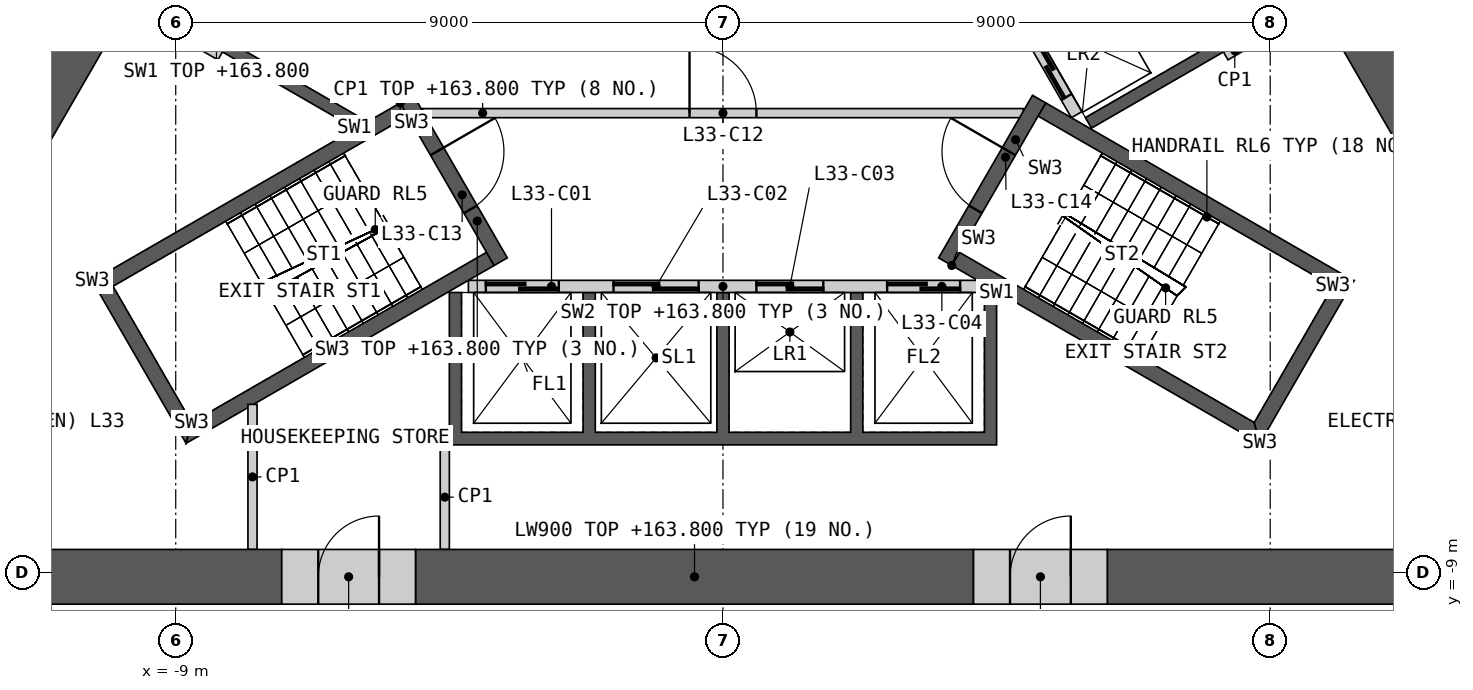
"""IFC4 building model, lengths in metres.
Left out: names, types, materials, properties, quantities, classifications, styles, units other than length and angle.
Written with IfcOpenShell. Run it as: python <this file> out.ifc"""

import sys

from ifc_helpers import new_model, si_unit, direction, frame, frame_2d, origin, place, context, subcontext, project, spatial, polyline, rectangle, outline, extrude, element, fill, save


model = new_model("IFC4")
c1 = context("Model", 3, precision=1e-05, world=origin(), true_north=direction((0.0, 1.0)))
c2 = subcontext(c1, "Body", "Model", "MODEL_VIEW")
j1 = project(units=[si_unit("LENGTHUNIT", "METRE"), si_unit("PLANEANGLEUNIT", "RADIAN")], contexts=[c1])
p1 = place(None, origin())
s1 = spatial("IfcSite", under=j1, at=p1, CompositionType="ELEMENT")
p2 = place(p1, origin())
s2 = spatial("IfcBuilding", under=s1, at=p2, CompositionType="ELEMENT")
p3 = place(p2, frame((0.0, 0.0, 154.2)))
s3 = spatial("IfcBuildingStorey", under=s2, at=p3, CompositionType="ELEMENT", Elevation=154.2)
p4 = place(p3, origin())
e1 = element("IfcWall", 1, at=p4, inside=s3, PredefinedType="SHEAR", context=c2, shape_type="SweptSolid", body=[
    extrude(outline(polyline([(4.5, -4.4), (4.5, -6.906), (-4.5, -6.906), (-4.5, -4.4), (-4.3, -4.4), (-4.3, -6.7), (-2.3, -6.7), (-2.3, -4.4), (-2.1, -4.4), (-2.1, -6.7), (-0.1, -6.7), (-0.1, -4.4), (0.1, -4.4), (0.1, -6.7), (2.1, -6.7), (2.1, -4.4), (2.3, -4.4), (2.3, -6.7), (4.3, -6.7), (4.3, -4.4), (4.5, -4.4)])), origin(), (0.0, 0.0, 1.0), 9.6),
])
p5 = place(p3, frame((-4.187, -4.3, 0.0), z_axis=(0.0, 0.0, 1.0), x_axis=(1.0, 0.0, 0.0)))
e2 = element("IfcWall", 2, at=p5, inside=s3, PredefinedType="SOLIDWALL", context=c2, shape_type="SweptSolid", body=[
    extrude(rectangle(XDim=8.373, YDim=0.2, at=frame_2d((4.187, 0.0))), origin(), (0.0, 0.0, 1.0), 9.6),
])
p6 = place(p5, frame((0.287, 0.0, 0.0)))
e3 = element("IfcOpeningElement", 3, at=p6, cuts=e2, PredefinedType="OPENING", context=c2, shape_type="SweptSolid", body=[
    extrude(rectangle(XDim=1.2, YDim=2.1, at=frame_2d((0.6, 1.05))), frame((0.0, 0.11, 0.0), z_axis=(0.0, -1.0, 0.0), x_axis=(1.0, 0.0, 0.0)), (0.0, 0.0, 1.0), 0.22),
])
p7 = place(p5, frame((2.387, 0.0, 0.0)))
e4 = element("IfcOpeningElement", 4, at=p7, cuts=e2, PredefinedType="OPENING", context=c2, shape_type="SweptSolid", body=[
    extrude(rectangle(XDim=1.4, YDim=2.1, at=frame_2d((0.7, 1.05))), frame((0.0, 0.11, 0.0), z_axis=(0.0, -1.0, 0.0), x_axis=(1.0, 0.0, 0.0)), (0.0, 0.0, 1.0), 0.22),
])
p8 = place(p5, frame((4.737, 0.0, 0.0)))
e5 = element("IfcOpeningElement", 5, at=p8, cuts=e2, PredefinedType="OPENING", context=c2, shape_type="SweptSolid", body=[
    extrude(rectangle(XDim=1.1, YDim=2.1, at=frame_2d((0.55, 1.05))), frame((0.0, 0.11, 0.0), z_axis=(0.0, -1.0, 0.0), x_axis=(1.0, 0.0, 0.0)), (0.0, 0.0, 1.0), 0.22),
])
p9 = place(p5, frame((6.887, 0.0, 0.0)))
e6 = element("IfcOpeningElement", 6, at=p9, cuts=e2, PredefinedType="OPENING", context=c2, shape_type="SweptSolid", body=[
    extrude(rectangle(XDim=1.2, YDim=2.1, at=frame_2d((0.6, 1.05))), frame((0.0, 0.11, 0.0), z_axis=(0.0, -1.0, 0.0), x_axis=(1.0, 0.0, 0.0)), (0.0, 0.0, 1.0), 0.22),
])
p10 = place(p3, origin())
e7 = element("IfcWall", 7, at=p10, inside=s3, PredefinedType="SHEAR", context=c2, shape_type="SweptSolid", body=[
    extrude(outline(polyline([(1.561, 6.097), (3.731, 7.35), (8.231, -0.444), (6.061, -1.697), (5.96, -1.524), (7.952, -0.374), (6.952, 1.358), (4.96, 0.208), (4.861, 0.381), (6.852, 1.531), (5.852, 3.263), (3.861, 2.113), (3.76, 2.287), (5.752, 3.437), (4.752, 5.169), (2.76, 4.019), (2.66, 4.192), (4.652, 5.342), (3.652, 7.074), (1.66, 5.924), (1.561, 6.097)])), origin(), (0.0, 0.0, 1.0), 9.6),
])
p11 = place(p3, frame((5.817, -1.476, 0.0), z_axis=(0.0, 0.0, 1.0), x_axis=(-0.500002616675, 0.866023893041, 0.0)))
e8 = element("IfcWall", 8, at=p11, inside=s3, PredefinedType="SOLIDWALL", context=c2, shape_type="SweptSolid", body=[
    extrude(rectangle(XDim=8.373, YDim=0.2, at=frame_2d((4.187, 0.0))), origin(), (0.0, 0.0, 1.0), 9.6),
])
p12 = place(p11, frame((0.337, 0.0, 0.0)))
e9 = element("IfcOpeningElement", 9, at=p12, cuts=e8, PredefinedType="OPENING", context=c2, shape_type="SweptSolid", body=[
    extrude(rectangle(XDim=1.1, YDim=2.1, at=frame_2d((0.55, 1.05))), frame((0.0, 0.11, 0.0), z_axis=(0.0, -1.0, 0.0), x_axis=(1.0, 0.0, 0.0)), (0.0, 0.0, 1.0), 0.22),
])
p13 = place(p11, frame((2.537, 0.0, 0.0)))
e10 = element("IfcOpeningElement", 10, at=p13, cuts=e8, PredefinedType="OPENING", context=c2, shape_type="SweptSolid", body=[
    extrude(rectangle(XDim=1.1, YDim=2.1, at=frame_2d((0.55, 1.05))), frame((0.0, 0.11, 0.0), z_axis=(0.0, -1.0, 0.0), x_axis=(1.0, 0.0, 0.0)), (0.0, 0.0, 1.0), 0.22),
])
p14 = place(p11, frame((4.737, 0.0, 0.0)))
e11 = element("IfcOpeningElement", 11, at=p14, cuts=e8, PredefinedType="OPENING", context=c2, shape_type="SweptSolid", body=[
    extrude(rectangle(XDim=1.1, YDim=2.1, at=frame_2d((0.55, 1.05))), frame((0.0, 0.11, 0.0), z_axis=(0.0, -1.0, 0.0), x_axis=(1.0, 0.0, 0.0)), (0.0, 0.0, 1.0), 0.22),
])
p15 = place(p11, frame((6.937, 0.0, 0.0)))
e12 = element("IfcOpeningElement", 12, at=p15, cuts=e8, PredefinedType="OPENING", context=c2, shape_type="SweptSolid", body=[
    extrude(rectangle(XDim=1.1, YDim=2.1, at=frame_2d((0.55, 1.05))), frame((0.0, 0.11, 0.0), z_axis=(0.0, -1.0, 0.0), x_axis=(1.0, 0.0, 0.0)), (0.0, 0.0, 1.0), 0.22),
])
p16 = place(p3, origin())
e13 = element("IfcWall", 13, at=p16, inside=s3, PredefinedType="SHEAR", context=c2, shape_type="SweptSolid", body=[
    extrude(outline(polyline([(-6.061, -1.697), (-8.231, -0.444), (-8.131, -0.271), (-5.96, -1.524), (-6.061, -1.697)])), origin(), (0.0, 0.0, 1.0), 9.6),
])
p17 = place(p3, frame((-4.941, -1.45, 0.0), z_axis=(0.0, 0.0, 1.0), x_axis=(1.0, 0.0, 0.0)))
e14 = element("IfcWall", 14, at=p17, inside=s3, PredefinedType="PARTITIONING", context=c2, shape_type="SweptSolid", body=[
    extrude(rectangle(XDim=9.882, YDim=0.15, at=frame_2d((4.941, 0.0))), origin(), (0.0, 0.0, 1.0), 9.6),
])
p18 = place(p17, frame((4.391, 0.0, 0.0)))
e15 = element("IfcOpeningElement", 15, at=p18, cuts=e14, PredefinedType="OPENING", context=c2, shape_type="SweptSolid", body=[
    extrude(rectangle(XDim=1.1, YDim=2.1, at=frame_2d((0.55, 1.05))), frame((0.0, 0.085, 0.0), z_axis=(0.0, -1.0, 0.0), x_axis=(1.0, 0.0, 0.0)), (0.0, 0.0, 1.0), 0.17),
])
p19 = place(p3, origin())
e16 = element("IfcWall", 16, at=p19, inside=s3, PredefinedType="SHEAR", context=c2, shape_type="SweptSolid", body=[
    extrude(outline(polyline([(-5.307, -1.281), (-10.374, -4.206), (-10.032, -4.298), (-5.182, -1.498), (-5.307, -1.281)])), origin(), (0.0, 0.0, 1.0), 9.6),
])
p20 = place(p3, origin())
e17 = element("IfcWall", 17, at=p20, inside=s3, PredefinedType="SHEAR", context=c2, shape_type="SweptSolid", body=[
    extrude(outline(polyline([(-10.374, -4.206), (-8.83, -6.881), (-8.738, -6.539), (-10.032, -4.298), (-10.374, -4.206)])), origin(), (0.0, 0.0, 1.0), 9.6),
])
p21 = place(p3, origin())
e18 = element("IfcWall", 18, at=p21, inside=s3, PredefinedType="SHEAR", context=c2, shape_type="SweptSolid", body=[
    extrude(outline(polyline([(-8.738, -6.539), (-8.83, -6.881), (-3.763, -3.956), (-3.888, -3.739), (-8.738, -6.539)])), origin(), (0.0, 0.0, 1.0), 9.6),
])
p22 = place(p3, frame((-5.199, -1.219, 0.0), z_axis=(0.0, 0.0, 1.0), x_axis=(0.499982516597, -0.866035497597, 0.0)))
e19 = element("IfcWall", 19, at=p22, inside=s3, PredefinedType="SHEAR", context=c2, shape_type="SweptSolid", body=[
    extrude(rectangle(XDim=3.088, YDim=0.25, at=frame_2d((1.544, 0.0))), origin(), (0.0, 0.0, 1.0), 9.6),
])
p23 = place(p22, frame((0.994, 0.0, 0.0)))
e20 = element("IfcOpeningElement", 20, at=p23, cuts=e19, PredefinedType="OPENING", context=c2, shape_type="SweptSolid", body=[
    extrude(rectangle(XDim=1.1, YDim=2.1, at=frame_2d((0.55, 1.05))), frame((0.0, 0.135, 0.0), z_axis=(0.0, -1.0, 0.0), x_axis=(1.0, 0.0, 0.0)), (0.0, 0.0, 1.0), 0.27),
])
p24 = place(p3, origin())
e21 = element("IfcWall", 21, at=p24, inside=s3, PredefinedType="SHEAR", context=c2, shape_type="SweptSolid", body=[
    extrude(outline(polyline([(3.763, -3.956), (8.83, -6.881), (8.738, -6.539), (3.888, -3.739), (3.763, -3.956)])), origin(), (0.0, 0.0, 1.0), 9.6),
])
p25 = place(p3, origin())
e22 = element("IfcWall", 22, at=p25, inside=s3, PredefinedType="SHEAR", context=c2, shape_type="SweptSolid", body=[
    extrude(outline(polyline([(8.83, -6.881), (10.374, -4.206), (10.032, -4.298), (8.738, -6.539), (8.83, -6.881)])), origin(), (0.0, 0.0, 1.0), 9.6),
])
p26 = place(p3, origin())
e23 = element("IfcWall", 23, at=p26, inside=s3, PredefinedType="SHEAR", context=c2, shape_type="SweptSolid", body=[
    extrude(outline(polyline([(10.032, -4.298), (10.374, -4.206), (5.307, -1.281), (5.182, -1.498), (10.032, -4.298)])), origin(), (0.0, 0.0, 1.0), 9.6),
])
p27 = place(p3, frame((3.655, -3.893, 0.0), z_axis=(0.0, 0.0, 1.0), x_axis=(0.499982516597, 0.866035497597, 0.0)))
e24 = element("IfcWall", 24, at=p27, inside=s3, PredefinedType="SHEAR", context=c2, shape_type="SweptSolid", body=[
    extrude(rectangle(XDim=3.088, YDim=0.25, at=frame_2d((1.544, 0.0))), origin(), (0.0, 0.0, 1.0), 9.6),
])
p28 = place(p27, frame((0.994, 0.0, 0.0)))
e25 = element("IfcOpeningElement", 25, at=p28, cuts=e24, PredefinedType="OPENING", context=c2, shape_type="SweptSolid", body=[
    extrude(rectangle(XDim=1.1, YDim=2.1, at=frame_2d((0.55, 1.05))), frame((0.0, 0.135, 0.0), z_axis=(0.0, -1.0, 0.0), x_axis=(1.0, 0.0, 0.0)), (0.0, 0.0, 1.0), 0.27),
])
for number, where, z_axis, x_axis in (
    (26, (8.268, -0.509, 0.0), (0.0, 0.0, 1.0), (0.866, 0.5, 0.0)),
    (27, (-8.268, -0.509, 0.0), (0.0, 0.0, 1.0), (-0.866, 0.5, 0.0)),
    (28, (-4.575, -6.906, 0.0), (0.0, 0.0, 1.0), (0.0, -1.0, 0.0)),
):
    element("IfcWall", number, at=place(p3, frame(where, z_axis=z_axis, x_axis=x_axis)), inside=s3, PredefinedType="PARTITIONING", context=c2, shape_type="SweptSolid", body=[
        extrude(rectangle(XDim=1.72, YDim=0.15, at=frame_2d((0.86, 0.0))), origin(), (0.0, 0.0, 1.0), 9.6),
    ])
p29 = place(p3, frame((-7.737, -8.626, 0.0), z_axis=(0.0, 0.0, 1.0), x_axis=(0.0, 1.0, 0.0)))
e29 = element("IfcWall", 29, at=p29, inside=s3, PredefinedType="PARTITIONING", context=c2, shape_type="SweptSolid", body=[
    extrude(rectangle(XDim=2.386, YDim=0.15, at=frame_2d((1.193, 0.0))), origin(), (0.0, 0.0, 1.0), 9.6),
])
p30 = place(p3, frame((-5.056, -9.076, 0.0), z_axis=(0.0, 0.0, 1.0), x_axis=(1.0, 0.0, 0.0)))
e30 = element("IfcWall", 30, at=p30, inside=s3, PredefinedType="SHEAR", context=c2, shape_type="SweptSolid", body=[
    extrude(rectangle(XDim=9.177, YDim=0.9, at=frame_2d((4.588, 0.0))), origin(), (0.0, 0.0, 1.0), 9.6),
])
p31 = place(p3, frame((6.321, -9.076, 0.0), z_axis=(0.0, 0.0, 1.0), x_axis=(1.0, 0.0, 0.0)))
e31 = element("IfcWall", 31, at=p31, inside=s3, PredefinedType="SHEAR", context=c2, shape_type="SweptSolid", body=[
    extrude(rectangle(XDim=8.621, YDim=0.9, at=frame_2d((4.31, 0.0))), origin(), (0.0, 0.0, 1.0), 9.6),
])
p32 = place(p3, frame((-14.941, -9.076, 0.0), z_axis=(0.0, 0.0, 1.0), x_axis=(1.0, 0.0, 0.0)))
e32 = element("IfcWall", 32, at=p32, inside=s3, PredefinedType="SHEAR", context=c2, shape_type="SweptSolid", body=[
    extrude(rectangle(XDim=7.685, YDim=0.9, at=frame_2d((3.843, 0.0))), origin(), (0.0, 0.0, 1.0), 9.6),
])
p33 = place(p3, frame((15.331, -8.401, 0.0), z_axis=(0.0, 0.0, 1.0), x_axis=(-0.499990163897, 0.866031082587, 0.0)))
e33 = element("IfcWall", 33, at=p33, inside=s3, PredefinedType="SHEAR", context=c2, shape_type="SweptSolid", body=[
    extrude(rectangle(XDim=13.841, YDim=0.9, at=frame_2d((6.92, 0.0))), origin(), (0.0, 0.0, 1.0), 9.6),
])
p34 = place(p3, frame((-10.06, 0.728, 0.0), z_axis=(0.0, 0.0, 1.0), x_axis=(-0.499996331799, -0.866027521611, 0.0)))
e34 = element("IfcWall", 34, at=p34, inside=s3, PredefinedType="SHEAR", context=c2, shape_type="SweptSolid", body=[
    extrude(rectangle(XDim=4.295, YDim=0.9, at=frame_2d((2.148, 0.0))), origin(), (0.0, 0.0, 1.0), 9.6),
])
p35 = place(p3, frame((-7.256, -9.076, 0.0), z_axis=(0.0, 0.0, 1.0), x_axis=(1.0, 0.0, 0.0)))
e35 = element("IfcWall", 35, at=p35, inside=s3, PredefinedType="SHEAR", context=c2, shape_type="SweptSolid", body=[
    extrude(rectangle(XDim=2.2, YDim=0.9, at=frame_2d((1.1, 0.0))), origin(), (0.0, 0.0, 1.0), 9.6),
])
p36 = place(p35, frame((0.6, 0.0, 0.0)))
e36 = element("IfcOpeningElement", 36, at=p36, cuts=e35, PredefinedType="OPENING", context=c2, shape_type="SweptSolid", body=[
    extrude(rectangle(XDim=1.0, YDim=2.1, at=frame_2d((0.5, 1.05))), frame((0.0, 0.46, 0.0), z_axis=(0.0, -1.0, 0.0), x_axis=(1.0, 0.0, 0.0)), (0.0, 0.0, 1.0), 0.92),
])
p37 = place(p3, frame((4.121, -9.076, 0.0), z_axis=(0.0, 0.0, 1.0), x_axis=(1.0, 0.0, 0.0)))
e37 = element("IfcWall", 37, at=p37, inside=s3, PredefinedType="SHEAR", context=c2, shape_type="SweptSolid", body=[
    extrude(rectangle(XDim=2.2, YDim=0.9, at=frame_2d((1.1, 0.0))), origin(), (0.0, 0.0, 1.0), 9.6),
])
p38 = place(p37, frame((0.6, 0.0, 0.0)))
e38 = element("IfcOpeningElement", 38, at=p38, cuts=e37, PredefinedType="OPENING", context=c2, shape_type="SweptSolid", body=[
    extrude(rectangle(XDim=1.0, YDim=2.1, at=frame_2d((0.5, 1.05))), frame((0.0, 0.46, 0.0), z_axis=(0.0, -1.0, 0.0), x_axis=(1.0, 0.0, 0.0)), (0.0, 0.0, 1.0), 0.92),
])
p39 = place(p3, frame((10.46, 5.736, 0.0), z_axis=(0.0, 0.0, 1.0), x_axis=(0.500004141693, -0.866023012564, 0.0)))
e39 = element("IfcWall", 39, at=p39, inside=s3, PredefinedType="PARTITIONING", context=c2, shape_type="SweptSolid", body=[
    extrude(rectangle(XDim=9.803, YDim=0.2, at=frame_2d((4.902, 0.0))), origin(), (0.0, 0.0, 1.0), 9.6),
])
p40 = place(p39, frame((3.952, 0.0, 0.0)))
e40 = element("IfcOpeningElement", 40, at=p40, cuts=e39, PredefinedType="OPENING", context=c2, shape_type="SweptSolid", body=[
    extrude(rectangle(XDim=1.8, YDim=2.1, at=frame_2d((0.9, 1.05))), frame((0.0, 0.11, 0.0), z_axis=(0.0, -1.0, 0.0), x_axis=(1.0, 0.0, 0.0)), (0.0, 0.0, 1.0), 0.22),
])
p41 = place(p3, frame((-15.361, -2.754, 0.0), z_axis=(0.0, 0.0, 1.0), x_axis=(0.500004141693, 0.866023012564, 0.0)))
e41 = element("IfcWall", 41, at=p41, inside=s3, PredefinedType="PARTITIONING", context=c2, shape_type="SweptSolid", body=[
    extrude(rectangle(XDim=9.803, YDim=0.2, at=frame_2d((4.902, 0.0))), origin(), (0.0, 0.0, 1.0), 9.6),
])
p42 = place(p6, origin())
e42 = element("IfcDoor", 42, at=p42, inside=s3, OperationType="SLIDING_TO_LEFT", PredefinedType="DOOR", context=c2, shape_type="SweptSolid", body=[
    extrude(rectangle(XDim=1.2, YDim=2.1, at=frame_2d((0.6, 1.05))), frame((0.0, 0.025, 0.0), z_axis=(0.0, -1.0, 0.0), x_axis=(1.0, 0.0, 0.0)), (0.0, 0.0, 1.0), 0.05),
])
fill(e3, e42)
p43 = place(p7, origin())
e43 = element("IfcDoor", 43, at=p43, inside=s3, OperationType="SLIDING_TO_LEFT", PredefinedType="DOOR", context=c2, shape_type="SweptSolid", body=[
    extrude(rectangle(XDim=1.4, YDim=2.1, at=frame_2d((0.7, 1.05))), frame((0.0, 0.025, 0.0), z_axis=(0.0, -1.0, 0.0), x_axis=(1.0, 0.0, 0.0)), (0.0, 0.0, 1.0), 0.05),
])
fill(e4, e43)
p44 = place(p8, origin())
e44 = element("IfcDoor", 44, at=p44, inside=s3, OperationType="SLIDING_TO_LEFT", PredefinedType="DOOR", context=c2, shape_type="SweptSolid", body=[
    extrude(rectangle(XDim=1.1, YDim=2.1, at=frame_2d((0.55, 1.05))), frame((0.0, 0.025, 0.0), z_axis=(0.0, -1.0, 0.0), x_axis=(1.0, 0.0, 0.0)), (0.0, 0.0, 1.0), 0.05),
])
fill(e5, e44)
p45 = place(p9, origin())
e45 = element("IfcDoor", 45, at=p45, inside=s3, OperationType="SLIDING_TO_LEFT", PredefinedType="DOOR", context=c2, shape_type="SweptSolid", body=[
    extrude(rectangle(XDim=1.2, YDim=2.1, at=frame_2d((0.6, 1.05))), frame((0.0, 0.025, 0.0), z_axis=(0.0, -1.0, 0.0), x_axis=(1.0, 0.0, 0.0)), (0.0, 0.0, 1.0), 0.05),
])
fill(e6, e45)
p46 = place(p12, origin())
e46 = element("IfcDoor", 46, at=p46, inside=s3, OperationType="SLIDING_TO_LEFT", PredefinedType="DOOR", context=c2, shape_type="SweptSolid", body=[
    extrude(rectangle(XDim=1.1, YDim=2.1, at=frame_2d((0.55, 1.05))), frame((0.0, 0.025, 0.0), z_axis=(0.0, -1.0, 0.0), x_axis=(1.0, 0.0, 0.0)), (0.0, 0.0, 1.0), 0.05),
])
fill(e9, e46)
p47 = place(p18, origin())
e47 = element("IfcDoor", 47, at=p47, inside=s3, OperationType="SINGLE_SWING_LEFT", PredefinedType="DOOR", context=c2, shape_type="SweptSolid", body=[
    extrude(rectangle(XDim=1.1, YDim=2.1, at=frame_2d((0.55, 1.05))), frame((0.0, 0.025, 0.0), z_axis=(0.0, -1.0, 0.0), x_axis=(1.0, 0.0, 0.0)), (0.0, 0.0, 1.0), 0.05),
])
fill(e15, e47)
p48 = place(p23, origin())
e48 = element("IfcDoor", 48, at=p48, inside=s3, OperationType="SINGLE_SWING_LEFT", PredefinedType="DOOR", context=c2, shape_type="SweptSolid", body=[
    extrude(rectangle(XDim=1.1, YDim=2.1, at=frame_2d((0.55, 1.05))), frame((0.0, 0.025, 0.0), z_axis=(0.0, -1.0, 0.0), x_axis=(1.0, 0.0, 0.0)), (0.0, 0.0, 1.0), 0.05),
])
fill(e20, e48)
p49 = place(p28, origin())
e49 = element("IfcDoor", 49, at=p49, inside=s3, OperationType="SINGLE_SWING_RIGHT", PredefinedType="DOOR", context=c2, shape_type="SweptSolid", body=[
    extrude(rectangle(XDim=1.1, YDim=2.1, at=frame_2d((0.55, 1.05))), frame((0.0, 0.025, 0.0), z_axis=(0.0, -1.0, 0.0), x_axis=(1.0, 0.0, 0.0)), (0.0, 0.0, 1.0), 0.05),
])
fill(e25, e49)
p50 = place(p36, origin())
e50 = element("IfcDoor", 50, at=p50, inside=s3, OperationType="SINGLE_SWING_RIGHT", PredefinedType="DOOR", context=c2, shape_type="SweptSolid", body=[
    extrude(rectangle(XDim=1.0, YDim=2.1, at=frame_2d((0.5, 1.05))), frame((0.0, 0.205, 0.0), z_axis=(0.0, -1.0, 0.0), x_axis=(1.0, 0.0, 0.0)), (0.0, 0.0, 1.0), 0.05),
])
fill(e36, e50)
p51 = place(p38, origin())
e51 = element("IfcDoor", 51, at=p51, inside=s3, OperationType="SINGLE_SWING_RIGHT", PredefinedType="DOOR", context=c2, shape_type="SweptSolid", body=[
    extrude(rectangle(XDim=1.0, YDim=2.1, at=frame_2d((0.5, 1.05))), frame((0.0, 0.205, 0.0), z_axis=(0.0, -1.0, 0.0), x_axis=(1.0, 0.0, 0.0)), (0.0, 0.0, 1.0), 0.05),
])
fill(e38, e51)
save(model, sys.argv[1])
